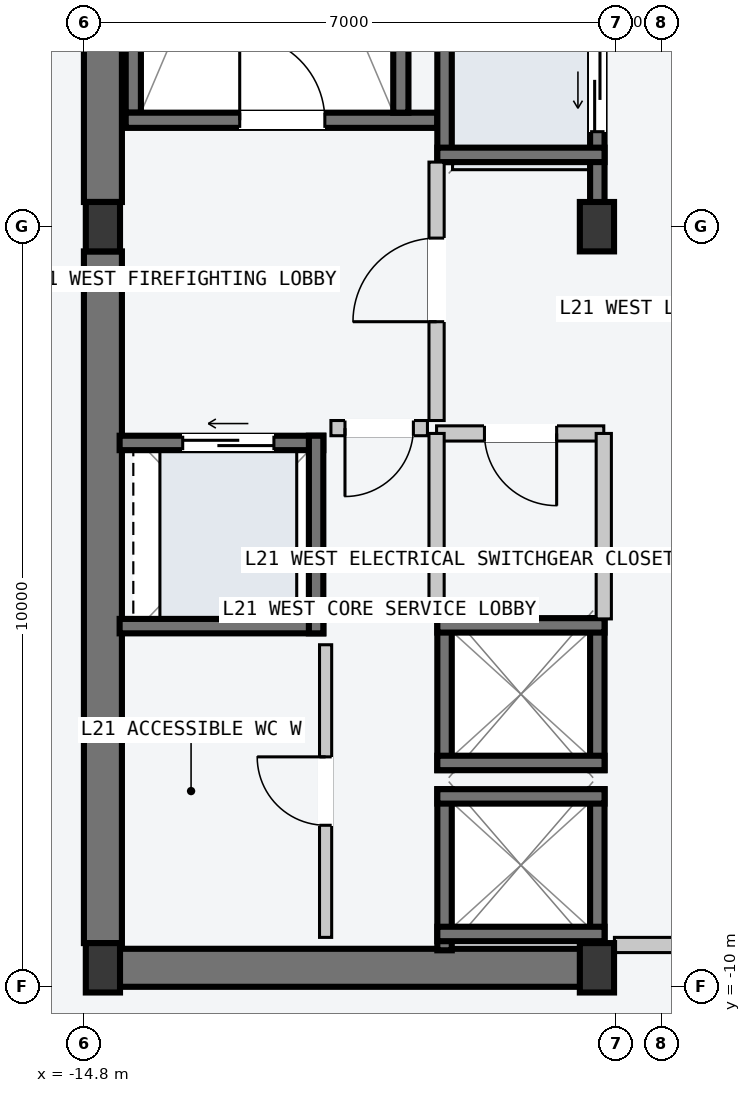
"""IFC4 building model, lengths in metres.
Left out: names, types, materials, properties, quantities, classifications, styles, units other than length and angle.
Written with IfcOpenShell. Run it as: python <this file> out.ifc"""

import sys

from ifc_helpers import new_model, si_unit, direction, frame, frame_2d, origin, origin_2d, place, context, subcontext, project, spatial, rectangle, i_section, extrude, element, fill, save


model = new_model("IFC4")
c1 = context("Model", 3, precision=1e-05, world=origin(), true_north=direction((0.0, 1.0)))
c2 = subcontext(c1, "Body", "Model", "MODEL_VIEW")
j1 = project(units=[si_unit("LENGTHUNIT", "METRE"), si_unit("PLANEANGLEUNIT", "RADIAN")], contexts=[c1])
p1 = place(None, origin())
s1 = spatial("IfcSite", under=j1, at=p1, CompositionType="ELEMENT")
p2 = place(p1, origin())
s2 = spatial("IfcBuilding", under=s1, at=p2, CompositionType="ELEMENT")
p3 = place(p2, frame((0.0, 0.0, 82.8)))
s3 = spatial("IfcBuildingStorey", under=s2, at=p3, CompositionType="ELEMENT", Elevation=82.8)
p4 = place(p3, frame((-14.53, -9.75, -0.2), z_axis=(0.0, 0.0, 1.0), x_axis=(1.0, 0.0, 0.0)))
e1 = element("IfcWall", 1, at=p4, inside=s3, PredefinedType="SHEAR", context=c2, shape_type="SweptSolid", body=[
    extrude(rectangle(XDim=6.46, YDim=0.5, at=frame_2d((3.23, 0.0))), origin(), (0.0, 0.0, 1.0), 4.5),
])
for number, where, z_axis, x_axis in (
    (2, (-14.55, -9.425, -0.2), (0.0, 0.0, 1.0), (0.0, 1.0, 0.0)),
    (3, (-14.55, 0.325, -0.2), (0.0, 0.0, 1.0), (0.0, 1.0, 0.0)),
):
    element("IfcWall", number, at=place(p3, frame(where, z_axis=z_axis, x_axis=x_axis)), inside=s3, PredefinedType="SHEAR", context=c2, shape_type="SweptSolid", body=[
        extrude(rectangle(XDim=9.1, YDim=0.5, at=frame_2d((4.55, 0.0))), origin(), (0.0, 0.0, 1.0), 4.5),
    ])
p5 = place(p3, frame((-14.15, 1.5, -0.2), z_axis=(0.0, 0.0, 1.0), x_axis=(0.0, 1.0, 0.0)))
e4 = element("IfcWall", 4, at=p5, inside=s3, PredefinedType="SOLIDWALL", context=c2, shape_type="SweptSolid", body=[
    extrude(rectangle(XDim=7.8, YDim=0.2, at=frame_2d((3.9, 0.0))), origin(), (0.0, 0.0, 1.0), 4.5),
])
p6 = place(p3, frame((-14.25, 1.4, -0.2), z_axis=(0.0, 0.0, 1.0), x_axis=(1.0, 0.0, 0.0)))
e5 = element("IfcWall", 5, at=p6, inside=s3, PredefinedType="SOLIDWALL", context=c2, shape_type="SweptSolid", body=[
    extrude(rectangle(XDim=4.1, YDim=0.2, at=frame_2d((2.05, 0.0))), origin(), (0.0, 0.0, 1.0), 4.5),
])
p7 = place(p6, frame((1.5, 0.0, 0.2)))
e6 = element("IfcOpeningElement", 6, at=p7, cuts=e5, PredefinedType="OPENING", context=c2, shape_type="SweptSolid", body=[
    extrude(rectangle(XDim=1.12, YDim=2.18, at=frame_2d((0.56, 1.09))), frame((0.0, 0.11, 0.0), z_axis=(0.0, -1.0, 0.0), x_axis=(1.0, 0.0, 0.0)), (0.0, 0.0, 1.0), 0.22),
])
p8 = place(p3, frame((-10.63, 1.5, -0.2), z_axis=(0.0, 0.0, 1.0), x_axis=(0.0, 1.0, 0.0)))
e7 = element("IfcWall", 7, at=p8, inside=s3, PredefinedType="SOLIDWALL", context=c2, shape_type="SweptSolid", body=[
    extrude(rectangle(XDim=7.8, YDim=0.2, at=frame_2d((3.9, 0.0))), origin(), (0.0, 0.0, 1.0), 4.5),
])
for number, where, z_axis, x_axis in (
    (8, (-14.55, -9.75, 0.0), (0.0, 0.0, 1.0), (1.0, 0.0, 0.0)),
    (9, (-14.55, 0.0, 0.0), (0.0, 0.0, 1.0), (1.0, 0.0, 0.0)),
    (10, (-8.05, -9.75, 0.0), (0.0, 0.0, 1.0), (1.0, 0.0, 0.0)),
    (11, (-8.05, 0.0, 0.0), (0.0, 0.0, 1.0), (1.0, 0.0, 0.0)),
):
    element("IfcColumn", number, at=place(p3, frame(where, z_axis=z_axis, x_axis=x_axis)), inside=s3, PredefinedType="COLUMN", context=c2, shape_type="SweptSolid", body=[
        extrude(i_section(OverallWidth=0.45, OverallDepth=0.65, WebThickness=0.025, FlangeThickness=0.04, at=origin_2d()), origin(), (0.0, 0.0, 1.0), 4.5),
    ])
p9 = place(p3, frame((-8.045, 0.21, -0.2), z_axis=(0.0, 0.0, 1.0), x_axis=(0.0, 1.0, 0.0)))
e12 = element("IfcWall", 12, at=p9, inside=s3, PredefinedType="SOLIDWALL", context=c2, shape_type="SweptSolid", body=[
    extrude(rectangle(XDim=2.54, YDim=0.19, at=frame_2d((1.27, 0.0))), origin(), (0.0, 0.0, 1.0), 4.5),
])
p10 = place(p9, frame((1.04, 0.0, 0.2)))
e13 = element("IfcOpeningElement", 13, at=p10, cuts=e12, PredefinedType="OPENING", context=c2, shape_type="SweptSolid", body=[
    extrude(rectangle(XDim=1.1, YDim=2.2, at=frame_2d((0.55, 1.1))), frame((0.0, 0.105, 0.0), z_axis=(0.0, -1.0, 0.0), x_axis=(1.0, 0.0, 0.0)), (0.0, 0.0, 1.0), 0.21),
])
p11 = place(p3, frame((-10.055, 0.85, -0.2), z_axis=(0.0, 0.0, 1.0), x_axis=(0.0, 1.0, 0.0)))
e14 = element("IfcWall", 14, at=p11, inside=s3, PredefinedType="SOLIDWALL", context=c2, shape_type="SweptSolid", body=[
    extrude(rectangle(XDim=1.9, YDim=0.19, at=frame_2d((0.95, 0.0))), origin(), (0.0, 0.0, 1.0), 4.5),
])
p12 = place(p3, frame((-10.15, 0.945, -0.2), z_axis=(0.0, 0.0, 1.0), x_axis=(1.0, 0.0, 0.0)))
e15 = element("IfcWall", 15, at=p12, inside=s3, PredefinedType="SOLIDWALL", context=c2, shape_type="SweptSolid", body=[
    extrude(rectangle(XDim=2.2, YDim=0.19, at=frame_2d((1.1, 0.0))), origin(), (0.0, 0.0, 1.0), 4.5),
])
for number, where, z_axis, x_axis in (
    (16, (-8.045, -9.52, -0.2), (0.0, 0.0, 1.0), (0.0, 1.0, 0.0)),
    (17, (-10.055, -9.52, -0.2), (0.0, 0.0, 1.0), (0.0, 1.0, 0.0)),
):
    element("IfcWall", number, at=place(p3, frame(where, z_axis=z_axis, x_axis=x_axis)), inside=s3, PredefinedType="SOLIDWALL", context=c2, shape_type="SweptSolid", body=[
        extrude(rectangle(XDim=2.12, YDim=0.19, at=frame_2d((1.06, 0.0))), origin(), (0.0, 0.0, 1.0), 4.5),
    ])
for number, where, z_axis, x_axis in (
    (18, (-10.15, -7.495, -0.2), (0.0, 0.0, 1.0), (1.0, 0.0, 0.0)),
    (19, (-10.15, -9.305, -0.2), (0.0, 0.0, 1.0), (1.0, 0.0, 0.0)),
):
    element("IfcWall", number, at=place(p3, frame(where, z_axis=z_axis, x_axis=x_axis)), inside=s3, PredefinedType="SOLIDWALL", context=c2, shape_type="SweptSolid", body=[
        extrude(rectangle(XDim=2.2, YDim=0.19, at=frame_2d((1.1, 0.0))), origin(), (0.0, 0.0, 1.0), 4.5),
    ])
for number, where, z_axis, x_axis in (
    (20, (-8.045, -7.15, -0.2), (0.0, 0.0, 1.0), (0.0, 1.0, 0.0)),
    (21, (-10.055, -7.15, -0.2), (0.0, 0.0, 1.0), (0.0, 1.0, 0.0)),
):
    element("IfcWall", number, at=place(p3, frame(where, z_axis=z_axis, x_axis=x_axis)), inside=s3, PredefinedType="SOLIDWALL", context=c2, shape_type="SweptSolid", body=[
        extrude(rectangle(XDim=2.0, YDim=0.19, at=frame_2d((1.0, 0.0))), origin(), (0.0, 0.0, 1.0), 4.5),
    ])
for number, where, z_axis, x_axis in (
    (22, (-10.15, -5.245, -0.2), (0.0, 0.0, 1.0), (1.0, 0.0, 0.0)),
    (23, (-10.15, -7.055, -0.2), (0.0, 0.0, 1.0), (1.0, 0.0, 0.0)),
):
    element("IfcWall", number, at=place(p3, frame(where, z_axis=z_axis, x_axis=x_axis)), inside=s3, PredefinedType="SOLIDWALL", context=c2, shape_type="SweptSolid", body=[
        extrude(rectangle(XDim=2.2, YDim=0.19, at=frame_2d((1.1, 0.0))), origin(), (0.0, 0.0, 1.0), 4.5),
    ])
p13 = place(p3, frame((-14.33, -2.845, -0.2), z_axis=(0.0, 0.0, 1.0), x_axis=(1.0, 0.0, 0.0)))
e24 = element("IfcWall", 24, at=p13, inside=s3, PredefinedType="SOLIDWALL", context=c2, shape_type="SweptSolid", body=[
    extrude(rectangle(XDim=2.68, YDim=0.19, at=frame_2d((1.34, 0.0))), origin(), (0.0, 0.0, 1.0), 4.5),
])
p14 = place(p13, frame((0.83, 0.0, 0.2)))
e25 = element("IfcOpeningElement", 25, at=p14, cuts=e24, PredefinedType="OPENING", context=c2, shape_type="SweptSolid", body=[
    extrude(rectangle(XDim=1.2, YDim=2.2, at=frame_2d((0.6, 1.1))), frame((0.0, 0.105, 0.0), z_axis=(0.0, -1.0, 0.0), x_axis=(1.0, 0.0, 0.0)), (0.0, 0.0, 1.0), 0.21),
])
p15 = place(p3, frame((-14.33, -5.255, -0.2), z_axis=(0.0, 0.0, 1.0), x_axis=(1.0, 0.0, 0.0)))
e26 = element("IfcWall", 26, at=p15, inside=s3, PredefinedType="SOLIDWALL", context=c2, shape_type="SweptSolid", body=[
    extrude(rectangle(XDim=2.68, YDim=0.19, at=frame_2d((1.34, 0.0))), origin(), (0.0, 0.0, 1.0), 4.5),
])
p16 = place(p3, frame((-11.745, -5.35, -0.2), z_axis=(0.0, 0.0, 1.0), x_axis=(0.0, 1.0, 0.0)))
e27 = element("IfcWall", 27, at=p16, inside=s3, PredefinedType="SOLIDWALL", context=c2, shape_type="SweptSolid", body=[
    extrude(rectangle(XDim=2.6, YDim=0.19, at=frame_2d((1.3, 0.0))), origin(), (0.0, 0.0, 1.0), 4.5),
])
p17 = place(p3, frame((-6.02, -9.45, 0.0), z_axis=(0.0, 0.0, 1.0), x_axis=(-1.0, 0.0, 0.0)))
e28 = element("IfcWall", 28, at=p17, inside=s3, PredefinedType="PARTITIONING", context=c2, shape_type="SweptSolid", body=[
    extrude(rectangle(XDim=1.8, YDim=0.2, at=frame_2d((0.9, 0.0))), origin(), (0.0, 0.0, 1.0), 2.64),
])
p18 = place(p3, frame((-10.16, -2.55, 0.0), z_axis=(0.0, 0.0, 1.0), x_axis=(0.0, 1.0, 0.0)))
e29 = element("IfcWall", 29, at=p18, inside=s3, PredefinedType="PARTITIONING", context=c2, shape_type="SweptSolid", body=[
    extrude(rectangle(XDim=3.4, YDim=0.2, at=frame_2d((1.7, 0.0))), origin(), (0.0, 0.0, 1.0), 4.3),
])
p19 = place(p18, frame((1.3, 0.0, 0.0)))
e30 = element("IfcOpeningElement", 30, at=p19, cuts=e29, PredefinedType="OPENING", context=c2, shape_type="SweptSolid", body=[
    extrude(rectangle(XDim=1.1, YDim=2.15, at=frame_2d((0.55, 1.075))), frame((0.0, 0.11, 0.0), z_axis=(0.0, -1.0, 0.0), x_axis=(1.0, 0.0, 0.0)), (0.0, 0.0, 1.0), 0.22),
])
p20 = place(p3, frame((-10.28, -2.65, 0.0), z_axis=(0.0, 0.0, 1.0), x_axis=(-1.0, 0.0, 0.0)))
e31 = element("IfcWall", 31, at=p20, inside=s3, PredefinedType="PARTITIONING", context=c2, shape_type="SweptSolid", body=[
    extrude(rectangle(XDim=1.27, YDim=0.2, at=frame_2d((0.635, 0.0))), origin(), (0.0, 0.0, 1.0), 4.3),
])
p21 = place(p20, frame((0.185, 0.0, 0.0)))
e32 = element("IfcOpeningElement", 32, at=p21, cuts=e31, PredefinedType="OPENING", context=c2, shape_type="SweptSolid", body=[
    extrude(rectangle(XDim=0.9, YDim=2.15, at=frame_2d((0.45, 1.075))), frame((0.0, 0.11, 0.0), z_axis=(0.0, -1.0, 0.0), x_axis=(1.0, 0.0, 0.0)), (0.0, 0.0, 1.0), 0.22),
])
p22 = place(p3, frame((-7.96, -2.72, 0.0), z_axis=(0.0, 0.0, 1.0), x_axis=(-1.0, 0.0, 0.0)))
e33 = element("IfcWall", 33, at=p22, inside=s3, PredefinedType="PARTITIONING", context=c2, shape_type="SweptSolid", body=[
    extrude(rectangle(XDim=2.2, YDim=0.2, at=frame_2d((1.1, 0.0))), origin(), (0.0, 0.0, 1.0), 4.3),
])
p23 = place(p22, frame((0.62, 0.0, 0.0)))
e34 = element("IfcOpeningElement", 34, at=p23, cuts=e33, PredefinedType="OPENING", context=c2, shape_type="SweptSolid", body=[
    extrude(rectangle(XDim=0.95, YDim=2.1, at=frame_2d((0.475, 1.05))), frame((0.0, 0.11, 0.0), z_axis=(0.0, -1.0, 0.0), x_axis=(1.0, 0.0, 0.0)), (0.0, 0.0, 1.0), 0.22),
])
for number, where, z_axis, x_axis in (
    (35, (-7.96, -5.16, 0.0), (0.0, 0.0, 1.0), (0.0, 1.0, 0.0)),
    (36, (-10.16, -5.16, 0.0), (0.0, 0.0, 1.0), (0.0, 1.0, 0.0)),
):
    element("IfcWall", number, at=place(p3, frame(where, z_axis=z_axis, x_axis=x_axis)), inside=s3, PredefinedType="PARTITIONING", context=c2, shape_type="SweptSolid", body=[
        extrude(rectangle(XDim=2.44, YDim=0.2, at=frame_2d((1.22, 0.0))), origin(), (0.0, 0.0, 1.0), 4.3),
    ])
p24 = place(p3, frame((-11.62, -9.35, 0.0), z_axis=(0.0, 0.0, 1.0), x_axis=(0.0, 1.0, 0.0)))
e37 = element("IfcWall", 37, at=p24, inside=s3, PredefinedType="PARTITIONING", context=c2, shape_type="SweptSolid", body=[
    extrude(rectangle(XDim=3.85, YDim=0.16, at=frame_2d((1.925, 0.0))), origin(), (0.0, 0.0, 1.0), 4.3),
])
p25 = place(p24, frame((1.475, 0.0, 0.0)))
e38 = element("IfcOpeningElement", 38, at=p25, cuts=e37, PredefinedType="OPENING", context=c2, shape_type="SweptSolid", body=[
    extrude(rectangle(XDim=0.9, YDim=2.15, at=frame_2d((0.45, 1.075))), frame((0.0, 0.09, 0.0), z_axis=(0.0, -1.0, 0.0), x_axis=(1.0, 0.0, 0.0)), (0.0, 0.0, 1.0), 0.18),
])
p26 = place(p7, origin())
e39 = element("IfcDoor", 39, at=p26, inside=s3, OperationType="SINGLE_SWING_LEFT", PredefinedType="DOOR", context=c2, shape_type="SweptSolid", body=[
    extrude(rectangle(XDim=1.12, YDim=2.18, at=frame_2d((0.56, 1.09))), frame((0.0, 0.025, 0.0), z_axis=(0.0, -1.0, 0.0), x_axis=(1.0, 0.0, 0.0)), (0.0, 0.0, 1.0), 0.05),
])
fill(e6, e39)
p27 = place(p10, origin())
e40 = element("IfcDoor", 40, at=p27, inside=s3, OperationType="SLIDING_TO_LEFT", PredefinedType="DOOR", context=c2, shape_type="SweptSolid", body=[
    extrude(rectangle(XDim=1.1, YDim=2.2, at=frame_2d((0.55, 1.1))), frame((0.0, 0.025, 0.0), z_axis=(0.0, -1.0, 0.0), x_axis=(1.0, 0.0, 0.0)), (0.0, 0.0, 1.0), 0.05),
])
fill(e13, e40)
p28 = place(p14, origin())
e41 = element("IfcDoor", 41, at=p28, inside=s3, OperationType="SLIDING_TO_LEFT", PredefinedType="DOOR", context=c2, shape_type="SweptSolid", body=[
    extrude(rectangle(XDim=1.2, YDim=2.2, at=frame_2d((0.6, 1.1))), frame((0.0, 0.025, 0.0), z_axis=(0.0, -1.0, 0.0), x_axis=(1.0, 0.0, 0.0)), (0.0, 0.0, 1.0), 0.05),
])
fill(e25, e41)
p29 = place(p19, origin())
e42 = element("IfcDoor", 42, at=p29, inside=s3, OperationType="SINGLE_SWING_LEFT", PredefinedType="DOOR", context=c2, shape_type="SweptSolid", body=[
    extrude(rectangle(XDim=1.1, YDim=2.15, at=frame_2d((0.55, 1.075))), frame((0.0, 0.025, 0.0), z_axis=(0.0, -1.0, 0.0), x_axis=(1.0, 0.0, 0.0)), (0.0, 0.0, 1.0), 0.05),
])
fill(e30, e42)
p30 = place(p21, origin())
e43 = element("IfcDoor", 43, at=p30, inside=s3, OperationType="SINGLE_SWING_RIGHT", PredefinedType="DOOR", context=c2, shape_type="SweptSolid", body=[
    extrude(rectangle(XDim=0.9, YDim=2.15, at=frame_2d((0.45, 1.075))), frame((0.0, 0.025, 0.0), z_axis=(0.0, -1.0, 0.0), x_axis=(1.0, 0.0, 0.0)), (0.0, 0.0, 1.0), 0.05),
])
fill(e32, e43)
p31 = place(p23, origin())
e44 = element("IfcDoor", 44, at=p31, inside=s3, OperationType="SINGLE_SWING_LEFT", PredefinedType="DOOR", context=c2, shape_type="SweptSolid", body=[
    extrude(rectangle(XDim=0.95, YDim=2.1, at=frame_2d((0.475, 1.05))), frame((0.0, 0.025, 0.0), z_axis=(0.0, -1.0, 0.0), x_axis=(1.0, 0.0, 0.0)), (0.0, 0.0, 1.0), 0.05),
])
fill(e34, e44)
p32 = place(p25, origin())
e45 = element("IfcDoor", 45, at=p32, inside=s3, OperationType="SINGLE_SWING_RIGHT", PredefinedType="DOOR", context=c2, shape_type="SweptSolid", body=[
    extrude(rectangle(XDim=0.9, YDim=2.15, at=frame_2d((0.45, 1.075))), frame((0.0, 0.025, 0.0), z_axis=(0.0, -1.0, 0.0), x_axis=(1.0, 0.0, 0.0)), (0.0, 0.0, 1.0), 0.05),
])
fill(e38, e45)
save(model, sys.argv[1])
